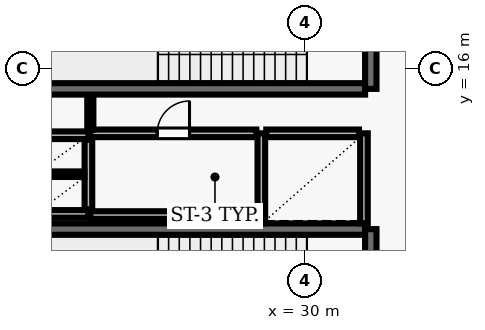
"""IFC4 building model, lengths in metres.
Left out: names, types, materials, properties, quantities, classifications, styles, units other than length and angle.
Written with IfcOpenShell. Run it as: python <this file> out.ifc"""

import sys

from ifc_helpers import new_model, si_unit, direction, frame, frame_2d, origin, place, context, subcontext, project, spatial, rectangle, extrude, element, fill, save


model = new_model("IFC4")
c1 = context("Model", 3, precision=1e-05, world=origin(), true_north=direction((0.0, 1.0)))
c2 = subcontext(c1, "Body", "Model", "MODEL_VIEW")
j1 = project(units=[si_unit("LENGTHUNIT", "METRE"), si_unit("PLANEANGLEUNIT", "RADIAN")], contexts=[c1])
p1 = place(None, origin())
s1 = spatial("IfcSite", under=j1, at=p1, CompositionType="ELEMENT")
p2 = place(p1, origin())
s2 = spatial("IfcBuilding", under=s1, at=p2, CompositionType="ELEMENT")
p3 = place(p2, frame((0.0, 0.0, 20.8)))
s3 = spatial("IfcBuildingStorey", under=s2, at=p3, CompositionType="ELEMENT", Elevation=20.8)
p4 = place(p3, frame((23.22, 15.47, 0.0), z_axis=(0.0, 0.0, 1.0), x_axis=(1.0, 0.0, 0.0)))
e1 = element("IfcWall", 1, at=p4, inside=s3, PredefinedType="SHEAR", context=c2, shape_type="SweptSolid", body=[
    extrude(rectangle(XDim=8.36, YDim=0.3, at=frame_2d((4.18, 0.0))), origin(), (0.0, 0.0, 1.0), 4.78),
])
p5 = place(p3, frame((31.73, 15.47, 0.0), z_axis=(0.0, 0.0, 1.0), x_axis=(0.0, 1.0, 0.0)))
e2 = element("IfcWall", 2, at=p5, inside=s3, PredefinedType="SHEAR", context=c2, shape_type="SweptSolid", body=[
    extrude(rectangle(XDim=3.51, YDim=0.3, at=frame_2d((1.755, 0.0))), origin(), (0.0, 0.0, 1.0), 4.78),
])
p6 = place(p5, frame((1.18, 0.0, 0.0)))
e3 = element("IfcOpeningElement", 3, at=p6, cuts=e2, PredefinedType="OPENING", context=c2, shape_type="SweptSolid", body=[
    extrude(rectangle(XDim=1.15, YDim=2.15, at=frame_2d((0.575, 1.075))), frame((0.0, 0.16, 0.0), z_axis=(0.0, -1.0, 0.0), x_axis=(1.0, 0.0, 0.0)), (0.0, 0.0, 1.0), 0.32),
])
p7 = place(p3, frame((31.58, 11.78, 0.0), z_axis=(0.0, 0.0, 1.0), x_axis=(-1.0, 0.0, 0.0)))
e4 = element("IfcWall", 4, at=p7, inside=s3, PredefinedType="SHEAR", context=c2, shape_type="SweptSolid", body=[
    extrude(rectangle(XDim=8.36, YDim=0.3, at=frame_2d((4.18, 0.0))), origin(), (0.0, 0.0, 1.0), 4.78),
])
p8 = place(p3, frame((31.73, 8.27, 0.0), z_axis=(0.0, 0.0, 1.0), x_axis=(0.0, 1.0, 0.0)))
e5 = element("IfcWall", 5, at=p8, inside=s3, PredefinedType="SHEAR", context=c2, shape_type="SweptSolid", body=[
    extrude(rectangle(XDim=3.51, YDim=0.3, at=frame_2d((1.755, 0.0))), origin(), (0.0, 0.0, 1.0), 4.78),
])
p9 = place(p8, frame((1.18, 0.0, 0.0)))
e6 = element("IfcOpeningElement", 6, at=p9, cuts=e5, PredefinedType="OPENING", context=c2, shape_type="SweptSolid", body=[
    extrude(rectangle(XDim=1.15, YDim=2.15, at=frame_2d((0.575, 1.075))), frame((0.0, 0.16, 0.0), z_axis=(0.0, -1.0, 0.0), x_axis=(1.0, 0.0, 0.0)), (0.0, 0.0, 1.0), 0.32),
])
for number, where, z_axis, x_axis in (
    (7, (28.85, 14.3, 0.0), (0.0, 0.0, 1.0), (0.0, -1.0, 0.0)),
    (8, (31.55, 11.93, 0.0), (0.0, 0.0, 1.0), (0.0, 1.0, 0.0)),
):
    element("IfcWall", number, at=place(p3, frame(where, z_axis=z_axis, x_axis=x_axis)), inside=s3, PredefinedType="SOLIDWALL", context=c2, shape_type="SweptSolid", body=[
        extrude(rectangle(XDim=2.37, YDim=0.2, at=frame_2d((1.185, 0.0))), origin(), (0.0, 0.0, 1.0), 4.78),
    ])
p10 = place(p3, frame((31.42, 14.3, 0.0), z_axis=(0.0, 0.0, 1.0), x_axis=(-1.0, 0.0, 0.0)))
e9 = element("IfcWall", 9, at=p10, inside=s3, PredefinedType="SOLIDWALL", context=c2, shape_type="SweptSolid", body=[
    extrude(rectangle(XDim=2.44, YDim=0.2, at=frame_2d((1.22, 0.0))), origin(), (0.0, 0.0, 1.0), 4.78),
])
for number, where, z_axis, x_axis in (
    (10, (22.9, 14.25, 0.0), (0.0, 0.0, 1.0), (1.0, 0.0, 0.0)),
    (11, (22.9, 12.18, 0.0), (0.0, 0.0, 1.0), (1.0, 0.0, 0.0)),
):
    element("IfcWall", number, at=place(p3, frame(where, z_axis=z_axis, x_axis=x_axis)), inside=s3, PredefinedType="SOLIDWALL", context=c2, shape_type="SweptSolid", body=[
        extrude(rectangle(XDim=1.4, YDim=0.2, at=frame_2d((0.7, 0.0))), origin(), (0.0, 0.0, 1.0), 4.78),
    ])
p11 = place(p3, frame((24.3, 12.3, 0.0), z_axis=(0.0, 0.0, 1.0), x_axis=(0.0, 1.0, 0.0)))
e12 = element("IfcWall", 12, at=p11, inside=s3, PredefinedType="SOLIDWALL", context=c2, shape_type="SweptSolid", body=[
    extrude(rectangle(XDim=1.83, YDim=0.2, at=frame_2d((0.915, 0.0))), origin(), (0.0, 0.0, 1.0), 4.78),
])
p12 = place(p3, frame((23.01, 13.225, 0.0), z_axis=(0.0, 0.0, 1.0), x_axis=(1.0, 0.0, 0.0)))
e13 = element("IfcWall", 13, at=p12, inside=s3, PredefinedType="PARTITIONING", context=c2, shape_type="SweptSolid", body=[
    extrude(rectangle(XDim=1.18, YDim=0.145, at=frame_2d((0.59, 0.0))), origin(), (0.0, 0.0, 1.0), 4.78),
])
p13 = place(p3, frame((24.35, 12.15, 0.0), z_axis=(0.0, 0.0, 1.0), x_axis=(1.0, 0.0, 0.0)))
e14 = element("IfcWall", 14, at=p13, inside=s3, PredefinedType="SOLIDWALL", context=c2, shape_type="SweptSolid", body=[
    extrude(rectangle(XDim=4.37, YDim=0.2, at=frame_2d((2.185, 0.0))), origin(), (0.0, 0.0, 1.0), 4.78),
])
p14 = place(p3, frame((24.35, 14.3, 0.0), z_axis=(0.0, 0.0, 1.0), x_axis=(1.0, 0.0, 0.0)))
e15 = element("IfcWall", 15, at=p14, inside=s3, PredefinedType="SOLIDWALL", context=c2, shape_type="SweptSolid", body=[
    extrude(rectangle(XDim=4.37, YDim=0.2, at=frame_2d((2.185, 0.0))), origin(), (0.0, 0.0, 1.0), 4.78),
])
p15 = place(p14, frame((1.76, 0.0, 0.0)))
e16 = element("IfcOpeningElement", 16, at=p15, cuts=e15, PredefinedType="OPENING", context=c2, shape_type="SweptSolid", body=[
    extrude(rectangle(XDim=0.85, YDim=2.1, at=frame_2d((0.425, 1.05))), frame((0.0, 0.11, 0.0), z_axis=(0.0, -1.0, 0.0), x_axis=(1.0, 0.0, 0.0)), (0.0, 0.0, 1.0), 0.22),
])
p16 = place(p3, frame((24.35, 15.29, 0.0), z_axis=(0.0, 0.0, 1.0), x_axis=(0.0, -1.0, 0.0)))
e17 = element("IfcWall", 17, at=p16, inside=s3, PredefinedType="PARTITIONING", context=c2, shape_type="SweptSolid", body=[
    extrude(rectangle(XDim=0.895, YDim=0.16, at=frame_2d((0.448, 0.0))), origin(), (0.0, 0.0, 1.0), 4.78),
])
p17 = place(p15, origin())
e18 = element("IfcDoor", 18, at=p17, inside=s3, OperationType="SINGLE_SWING_RIGHT", PredefinedType="DOOR", context=c2, shape_type="SweptSolid", body=[
    extrude(rectangle(XDim=0.85, YDim=2.1, at=frame_2d((0.425, 1.05))), frame((0.0, 0.025, 0.0), z_axis=(0.0, -1.0, 0.0), x_axis=(1.0, 0.0, 0.0)), (0.0, 0.0, 1.0), 0.05),
])
fill(e16, e18)
save(model, sys.argv[1])
